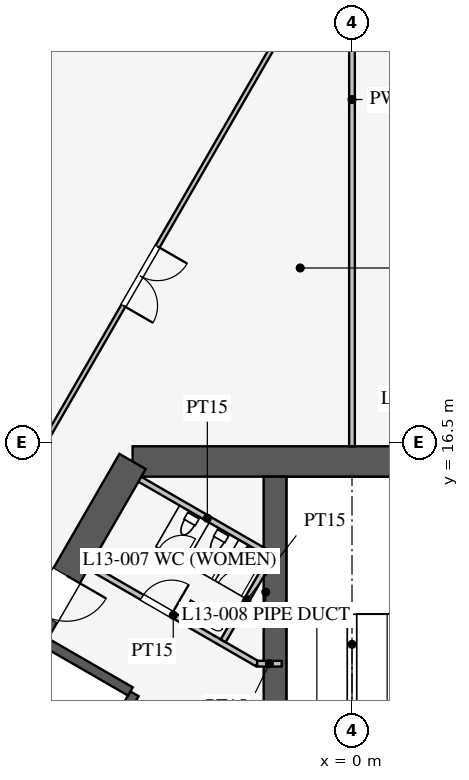
"""IFC4 building model, lengths in metres.
Left out: names, types, materials, properties, quantities, classifications, styles, units other than length and angle.
Written with IfcOpenShell. Run it as: python <this file> out.ifc"""

import sys

from ifc_helpers import new_model, si_unit, direction, frame, frame_2d, origin, place, context, subcontext, project, spatial, rectangle, extrude, element, fill, save


model = new_model("IFC4")
c1 = context("Model", 3, precision=1e-05, world=origin(), true_north=direction((0.0, 1.0)))
c2 = subcontext(c1, "Body", "Model", "MODEL_VIEW")
j1 = project(units=[si_unit("LENGTHUNIT", "METRE"), si_unit("PLANEANGLEUNIT", "RADIAN")], contexts=[c1])
p1 = place(None, origin())
s1 = spatial("IfcSite", under=j1, at=p1, CompositionType="ELEMENT")
p2 = place(p1, origin())
s2 = spatial("IfcBuilding", under=s1, at=p2, CompositionType="ELEMENT")
p3 = place(p2, frame((0.0, 0.0, 58.5)))
s3 = spatial("IfcBuildingStorey", under=s2, at=p3, CompositionType="ELEMENT", Elevation=58.5)
p4 = place(p3, frame((5.773, 16.0, 0.0), z_axis=(0.0, 0.0, 1.0), x_axis=(-1.0, 0.0, 0.0)))
e1 = element("IfcWall", 1, at=p4, inside=s3, PredefinedType="SHEAR", context=c2, shape_type="SweptSolid", body=[
    extrude(rectangle(XDim=11.547, YDim=0.8, at=frame_2d((5.773, 0.0))), origin(), (0.0, 0.0, 1.0), 4.2),
])
p5 = place(p3, frame((-5.773, 16.0, 0.0), z_axis=(0.0, 0.0, 1.0), x_axis=(-0.500002442456, -0.866023993627, 0.0)))
e2 = element("IfcWall", 2, at=p5, inside=s3, PredefinedType="SHEAR", context=c2, shape_type="SweptSolid", body=[
    extrude(rectangle(XDim=21.939, YDim=0.8, at=frame_2d((10.97, 0.0))), origin(), (0.0, 0.0, 1.0), 4.2),
])
p6 = place(p5, frame((17.27, 0.0, 0.0)))
e3 = element("IfcOpeningElement", 3, at=p6, cuts=e2, PredefinedType="OPENING", context=c2, shape_type="SweptSolid", body=[
    extrude(rectangle(XDim=1.2, YDim=2.1, at=frame_2d((0.6, 1.05))), frame((0.0, 0.41, 0.0), z_axis=(0.0, -1.0, 0.0), x_axis=(1.0, 0.0, 0.0)), (0.0, 0.0, 1.0), 0.82),
])
p7 = place(p5, frame((3.47, 0.0, 0.0)))
e4 = element("IfcOpeningElement", 4, at=p7, cuts=e2, PredefinedType="OPENING", context=c2, shape_type="SweptSolid", body=[
    extrude(rectangle(XDim=1.2, YDim=2.1, at=frame_2d((0.6, 1.05))), frame((0.0, 0.41, 0.0), z_axis=(0.0, -1.0, 0.0), x_axis=(1.0, 0.0, 0.0)), (0.0, 0.0, 1.0), 0.82),
])
p8 = place(p3, frame((-5.724, 9.886, 0.0), z_axis=(0.0, 0.0, 1.0), x_axis=(-0.500001763848, -0.866024385424, 0.0)))
e5 = element("IfcWall", 5, at=p8, inside=s3, PredefinedType="SHEAR", context=c2, shape_type="SweptSolid", body=[
    extrude(rectangle(XDim=11.4, YDim=0.25, at=frame_2d((5.7, 0.0))), origin(), (0.0, 0.0, 1.0), 4.2),
])
p9 = place(p8, frame((6.525, 0.0, 0.0)))
e6 = element("IfcOpeningElement", 6, at=p9, cuts=e5, PredefinedType="OPENING", context=c2, shape_type="SweptSolid", body=[
    extrude(rectangle(XDim=1.2, YDim=2.2, at=frame_2d((0.6, 1.1))), frame((0.0, 0.135, 0.0), z_axis=(0.0, -1.0, 0.0), x_axis=(1.0, 0.0, 0.0)), (0.0, 0.0, 1.0), 0.27),
])
p10 = place(p8, frame((9.375, 0.0, 0.0)))
e7 = element("IfcOpeningElement", 7, at=p10, cuts=e5, PredefinedType="OPENING", context=c2, shape_type="SweptSolid", body=[
    extrude(rectangle(XDim=1.2, YDim=2.2, at=frame_2d((0.6, 1.1))), frame((0.0, 0.135, 0.0), z_axis=(0.0, -1.0, 0.0), x_axis=(1.0, 0.0, 0.0)), (0.0, 0.0, 1.0), 0.27),
])
p11 = place(p3, frame((-5.832, 9.949, 0.0), z_axis=(0.0, 0.0, 1.0), x_axis=(-0.866029291668, 0.499993265928, 0.0)))
e8 = element("IfcWall", 8, at=p11, inside=s3, PredefinedType="SHEAR", context=c2, shape_type="SweptSolid", body=[
    extrude(rectangle(XDim=2.575, YDim=0.25, at=frame_2d((1.288, 0.0))), origin(), (0.0, 0.0, 1.0), 4.2),
])
p12 = place(p3, frame((-2.025, 6.525, 0.0), z_axis=(0.0, 0.0, 1.0), x_axis=(0.0, 1.0, 0.0)))
e9 = element("IfcWall", 9, at=p12, inside=s3, PredefinedType="SHEAR", context=c2, shape_type="SweptSolid", body=[
    extrude(rectangle(XDim=9.075, YDim=0.6, at=frame_2d((4.538, 0.0))), origin(), (0.0, 0.0, 1.0), 4.2),
])
p13 = place(p3, frame((-2.495, 10.678, 0.0), z_axis=(0.0, 0.0, 1.0), x_axis=(-0.86602216432, 0.500005610874, 0.0)))
e10 = element("IfcWall", 10, at=p13, inside=s3, PredefinedType="PARTITIONING", context=c2, shape_type="SweptSolid", body=[
    extrude(rectangle(XDim=5.1, YDim=0.15, at=frame_2d((2.55, 0.0))), origin(), (0.0, 0.0, 1.0), 4.0),
])
p14 = place(p13, frame((2.6, 0.0, 0.0)))
e11 = element("IfcOpeningElement", 11, at=p14, cuts=e10, PredefinedType="OPENING", context=c2, shape_type="SweptSolid", body=[
    extrude(rectangle(XDim=0.9, YDim=2.1, at=frame_2d((0.45, 1.05))), frame((0.0, 0.085, 0.0), z_axis=(0.0, -1.0, 0.0), x_axis=(1.0, 0.0, 0.0)), (0.0, 0.0, 1.0), 0.17),
])
p15 = place(p3, frame((-2.495, 10.678, 0.0), z_axis=(0.0, 0.0, 1.0), x_axis=(1.0, 0.0, 0.0)))
e12 = element("IfcWall", 12, at=p15, inside=s3, PredefinedType="PARTITIONING", context=c2, shape_type="SweptSolid", body=[
    extrude(rectangle(XDim=0.645, YDim=0.15, at=frame_2d((0.323, 0.0))), origin(), (0.0, 0.0, 1.0), 4.0),
])
p16 = place(p3, frame((-2.031, 13.482, 0.0), z_axis=(0.0, 0.0, 1.0), x_axis=(-0.866050731258, 0.499956128963, 0.0)))
e13 = element("IfcWall", 13, at=p16, inside=s3, PredefinedType="PARTITIONING", context=c2, shape_type="SweptSolid", body=[
    extrude(rectangle(XDim=4.1, YDim=0.15, at=frame_2d((2.05, 0.0))), origin(), (0.0, 0.0, 1.0), 4.0),
])
p17 = place(p3, frame((-3.389, 11.281, 0.0), z_axis=(0.0, 0.0, 1.0), x_axis=(0.499989096993, 0.866031698547, 0.0)))
e14 = element("IfcWall", 14, at=p17, inside=s3, PredefinedType="PARTITIONING", context=c2, shape_type="SweptSolid", body=[
    extrude(rectangle(XDim=2.51, YDim=0.15, at=frame_2d((1.255, 0.0))), origin(), (0.0, 0.0, 1.0), 4.0),
])
p18 = place(p3, frame((0.0, 16.4, 0.0), z_axis=(0.0, 0.0, 1.0), x_axis=(0.0, 1.0, 0.0)))
e15 = element("IfcWall", 15, at=p18, inside=s3, PredefinedType="PARTITIONING", context=c2, shape_type="SweptSolid", body=[
    extrude(rectangle(XDim=18.25, YDim=0.15, at=frame_2d((9.125, 0.0))), origin(), (0.0, 0.0, 1.0), 2.3),
])
p19 = place(p3, frame((-0.016, 30.491, 0.0), z_axis=(0.0, 0.0, 1.0), x_axis=(-0.50000091641, -0.866024874695, 0.0)))
e16 = element("IfcWall", 16, at=p19, inside=s3, PredefinedType="PARTITIONING", context=c2, shape_type="SweptSolid", body=[
    extrude(rectangle(XDim=52.796, YDim=0.12, at=frame_2d((26.398, 0.0))), origin(), (0.0, 0.0, 1.0), 2.9),
])
p20 = place(p19, frame((10.2, 0.0, 0.15)))
e17 = element("IfcOpeningElement", 17, at=p20, cuts=e16, PredefinedType="OPENING", context=c2, shape_type="SweptSolid", body=[
    extrude(rectangle(XDim=1.8, YDim=2.1, at=frame_2d((0.9, 1.05))), frame((0.0, 0.07, 0.0), z_axis=(0.0, -1.0, 0.0), x_axis=(1.0, 0.0, 0.0)), (0.0, 0.0, 1.0), 0.14),
])
p21 = place(p19, frame((40.8, 0.0, 0.15)))
e18 = element("IfcOpeningElement", 18, at=p21, cuts=e16, PredefinedType="OPENING", context=c2, shape_type="SweptSolid", body=[
    extrude(rectangle(XDim=1.8, YDim=2.1, at=frame_2d((0.9, 1.05))), frame((0.0, 0.07, 0.0), z_axis=(0.0, -1.0, 0.0), x_axis=(1.0, 0.0, 0.0)), (0.0, 0.0, 1.0), 0.14),
])
p22 = place(p14, frame((0.9, 0.0, 0.0), z_axis=(0.0, 0.0, 1.0), x_axis=(-1.0, 0.0, 0.0)))
e19 = element("IfcDoor", 19, at=p22, inside=s3, OperationType="SINGLE_SWING_RIGHT", PredefinedType="DOOR", context=c2, shape_type="SweptSolid", body=[
    extrude(rectangle(XDim=0.9, YDim=2.1, at=frame_2d((0.45, 1.05))), frame((0.0, 0.025, 0.0), z_axis=(0.0, -1.0, 0.0), x_axis=(1.0, 0.0, 0.0)), (0.0, 0.0, 1.0), 0.05),
])
fill(e11, e19)
p23 = place(p7, origin())
e20 = element("IfcDoor", 20, at=p23, inside=s3, OperationType="SINGLE_SWING_LEFT", PredefinedType="DOOR", context=c2, shape_type="SweptSolid", body=[
    extrude(rectangle(XDim=1.2, YDim=2.1, at=frame_2d((0.6, 1.05))), frame((0.0, 0.025, 0.0), z_axis=(0.0, -1.0, 0.0), x_axis=(1.0, 0.0, 0.0)), (0.0, 0.0, 1.0), 0.05),
])
fill(e4, e20)
p24 = place(p20, origin())
e21 = element("IfcDoor", 21, at=p24, inside=s3, OperationType="DOUBLE_DOOR_SINGLE_SWING", PredefinedType="DOOR", context=c2, shape_type="SweptSolid", body=[
    extrude(rectangle(XDim=1.8, YDim=2.1, at=frame_2d((0.9, 1.05))), frame((0.0, 0.025, 0.0), z_axis=(0.0, -1.0, 0.0), x_axis=(1.0, 0.0, 0.0)), (0.0, 0.0, 1.0), 0.05),
])
fill(e17, e21)
save(model, sys.argv[1])
